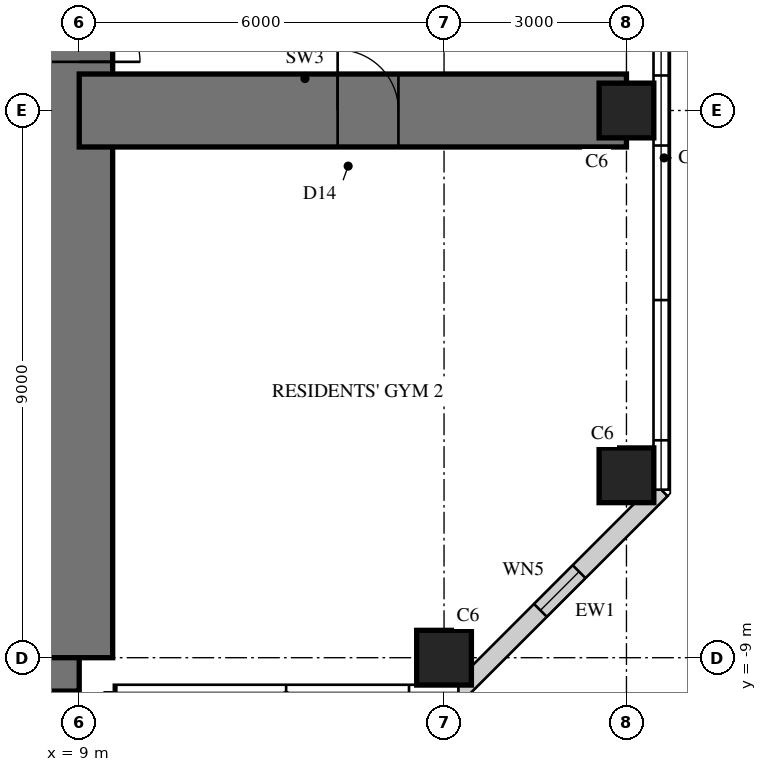
"""IFC4 building model, lengths in metres.
Left out: names, types, materials, properties, quantities, classifications, styles, units other than length and angle.
Written with IfcOpenShell. Run it as: python <this file> out.ifc"""

import sys

from ifc_helpers import new_model, si_unit, direction, frame, frame_2d, origin, origin_2d, place, context, subcontext, project, spatial, rectangle, hollow_rectangle, extrude, element, fill, save


model = new_model("IFC4")
c1 = context("Model", 3, precision=1e-05, world=origin(), true_north=direction((0.0, 1.0)))
c2 = subcontext(c1, "Body", "Model", "MODEL_VIEW")
j1 = project(units=[si_unit("LENGTHUNIT", "METRE"), si_unit("PLANEANGLEUNIT", "RADIAN")], contexts=[c1])
p1 = place(None, origin())
s1 = spatial("IfcSite", under=j1, at=p1, CompositionType="ELEMENT")
p2 = place(p1, origin())
s2 = spatial("IfcBuilding", under=s1, at=p2, CompositionType="ELEMENT")
p3 = place(p2, frame((0.0, 0.0, 217.1)))
s3 = spatial("IfcBuildingStorey", under=s2, at=p3, CompositionType="ELEMENT", Elevation=217.1)
p4 = place(p3, frame((-9.0, -9.0, 0.0), z_axis=(0.0, 0.0, 1.0), x_axis=(1.0, 0.0, 0.0)))
e1 = element("IfcWall", 1, at=p4, inside=s3, PredefinedType="SHEAR", context=c2, shape_type="SweptSolid", body=[
    extrude(rectangle(XDim=18.0, YDim=1.1, at=frame_2d((9.0, 0.0))), origin(), (0.0, 0.0, 1.0), 5.0),
])
p5 = place(p4, frame((9.8, 0.0, 0.0)))
e2 = element("IfcOpeningElement", 2, at=p5, cuts=e1, PredefinedType="OPENING", context=c2, shape_type="SweptSolid", body=[
    extrude(rectangle(XDim=1.0, YDim=2.4, at=frame_2d((0.5, 1.2))), frame((0.0, 0.56, 0.0), z_axis=(0.0, -1.0, 0.0), x_axis=(1.0, 0.0, 0.0)), (0.0, 0.0, 1.0), 1.12),
])
p6 = place(p3, frame((9.0, -9.0, 0.0), z_axis=(0.0, 0.0, 1.0), x_axis=(0.0, 1.0, 0.0)))
e3 = element("IfcWall", 3, at=p6, inside=s3, PredefinedType="SHEAR", context=c2, shape_type="SweptSolid", body=[
    extrude(rectangle(XDim=18.0, YDim=1.1, at=frame_2d((9.0, 0.0))), origin(), (0.0, 0.0, 1.0), 5.0),
])
p7 = place(p6, frame((9.8, 0.0, 0.0)))
e4 = element("IfcOpeningElement", 4, at=p7, cuts=e3, PredefinedType="OPENING", context=c2, shape_type="SweptSolid", body=[
    extrude(rectangle(XDim=1.0, YDim=2.4, at=frame_2d((0.5, 1.2))), frame((0.0, 0.56, 0.0), z_axis=(0.0, -1.0, 0.0), x_axis=(1.0, 0.0, 0.0)), (0.0, 0.0, 1.0), 1.12),
])
p8 = place(p3, frame((9.0, 0.0, 0.0), z_axis=(0.0, 0.0, 1.0), x_axis=(1.0, 0.0, 0.0)))
e5 = element("IfcWall", 5, at=p8, inside=s3, PredefinedType="SHEAR", context=c2, shape_type="SweptSolid", body=[
    extrude(rectangle(XDim=9.0, YDim=1.2, at=frame_2d((4.5, 0.0))), origin(), (0.0, 0.0, 1.0), 5.0),
])
p9 = place(p8, frame((4.25, 0.0, 0.0)))
e6 = element("IfcOpeningElement", 6, at=p9, cuts=e5, PredefinedType="OPENING", context=c2, shape_type="SweptSolid", body=[
    extrude(rectangle(XDim=1.0, YDim=2.2, at=frame_2d((0.5, 1.1))), frame((0.0, 0.61, 0.0), z_axis=(0.0, -1.0, 0.0), x_axis=(1.0, 0.0, 0.0)), (0.0, 0.0, 1.0), 1.22),
])
for number, where, z_axis, x_axis in (
    (7, (15.0, -9.0, 0.0), (0.0, 0.0, 1.0), (1.0, 0.0, 0.0)),
    (8, (18.0, -6.0, 0.0), (0.0, 0.0, 1.0), (1.0, 0.0, 0.0)),
    (9, (18.0, 0.0, 0.0), (0.0, 0.0, 1.0), (1.0, 0.0, 0.0)),
):
    element("IfcColumn", number, at=place(p3, frame(where, z_axis=z_axis, x_axis=x_axis)), inside=s3, PredefinedType="COLUMN", context=c2, shape_type="SweptSolid", body=[
        extrude(rectangle(XDim=0.9, YDim=0.9, at=origin_2d()), origin(), (0.0, 0.0, 1.0), 5.0),
    ])
p10 = place(p3, frame((15.236, -9.57, 0.0), z_axis=(0.0, 0.0, 1.0), x_axis=(0.707106781187, 0.707106781187, 0.0)))
e10 = element("IfcWall", 10, at=p10, inside=s3, PredefinedType="SOLIDWALL", context=c2, shape_type="SweptSolid", body=[
    extrude(rectangle(XDim=4.715, YDim=0.3, at=frame_2d((2.357, 0.0))), origin(), (0.0, 0.0, 1.0), 4.82),
])
p11 = place(p10, frame((1.907, 0.0, 0.3)))
e11 = element("IfcOpeningElement", 11, at=p11, cuts=e10, PredefinedType="OPENING", context=c2, shape_type="SweptSolid", body=[
    extrude(rectangle(XDim=0.9, YDim=2.4, at=frame_2d((0.45, 1.2))), frame((0.0, 0.16, 0.0), z_axis=(0.0, -1.0, 0.0), x_axis=(1.0, 0.0, 0.0)), (0.0, 0.0, 1.0), 0.32),
])
p12 = place(p11, origin())
e12 = element("IfcWindow", 12, at=p12, inside=s3, PartitioningType="SINGLE_PANEL", PredefinedType="WINDOW", context=c2, shape_type="SweptSolid", body=[
    extrude(hollow_rectangle(XDim=0.9, YDim=2.4, WallThickness=0.06, at=frame_2d((0.45, 1.2))), frame((0.0, 0.03, 0.0), z_axis=(0.0, -1.0, 0.0), x_axis=(1.0, 0.0, 0.0)), (0.0, 0.0, 1.0), 0.06),
    extrude(rectangle(XDim=0.779, YDim=2.279, at=frame_2d((0.45, 1.2))), frame((0.0, 0.03, 0.0), z_axis=(0.0, -1.0, 0.0), x_axis=(1.0, 0.0, 0.0)), (0.0, 0.0, 1.0), 0.06),
])
fill(e11, e12)
p13 = place(p9, origin())
e13 = element("IfcDoor", 13, at=p13, inside=s3, OperationType="SINGLE_SWING_LEFT", PredefinedType="DOOR", context=c2, shape_type="SweptSolid", body=[
    extrude(rectangle(XDim=1.0, YDim=2.2, at=frame_2d((0.5, 1.1))), frame((0.0, 0.025, 0.0), z_axis=(0.0, -1.0, 0.0), x_axis=(1.0, 0.0, 0.0)), (0.0, 0.0, 1.0), 0.05),
])
fill(e6, e13)
p14 = place(p7, frame((1.0, 0.0, 0.0), z_axis=(0.0, 0.0, 1.0), x_axis=(-1.0, 0.0, 0.0)))
e14 = element("IfcDoor", 14, at=p14, inside=s3, OperationType="SINGLE_SWING_RIGHT", PredefinedType="DOOR", context=c2, shape_type="SweptSolid", body=[
    extrude(rectangle(XDim=1.0, YDim=2.4, at=frame_2d((0.5, 1.2))), frame((0.0, -0.005, 0.0), z_axis=(0.0, -1.0, 0.0), x_axis=(1.0, 0.0, 0.0)), (0.0, 0.0, 1.0), 0.05),
])
fill(e4, e14)
save(model, sys.argv[1])
